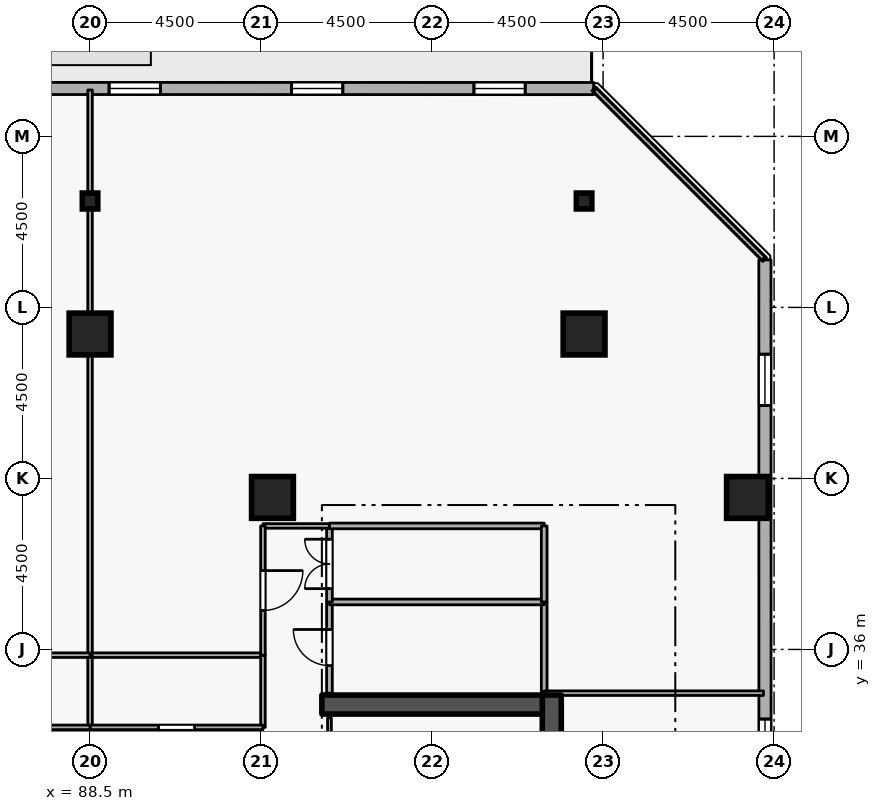
"""IFC4 building model, lengths in metres.
Left out: names, types, materials, properties, quantities, classifications, styles, units other than length and angle.
Written with IfcOpenShell. Run it as: python <this file> out.ifc"""

import sys

from ifc_helpers import new_model, si_unit, direction, frame, frame_2d, origin, origin_2d, place, context, subcontext, project, spatial, rectangle, i_section, extrude, element, fill, save


model = new_model("IFC4")
c1 = context("Model", 3, precision=1e-05, world=origin(), true_north=direction((0.0, 1.0)))
c2 = subcontext(c1, "Body", "Model", "MODEL_VIEW")
j1 = project(units=[si_unit("LENGTHUNIT", "METRE"), si_unit("PLANEANGLEUNIT", "RADIAN")], contexts=[c1])
p1 = place(None, origin())
s1 = spatial("IfcSite", under=j1, at=p1, CompositionType="ELEMENT")
p2 = place(p1, origin())
s2 = spatial("IfcBuilding", under=s1, at=p2, CompositionType="ELEMENT")
p3 = place(p2, frame((0.0, 0.0, 196.5)))
s3 = spatial("IfcBuildingStorey", under=s2, at=p3, CompositionType="ELEMENT", Elevation=196.5)
p4 = place(p3, frame((100.65, 19.2, 0.0), z_axis=(0.0, 0.0, 1.0), x_axis=(0.0, 1.0, 0.0)))
e1 = element("IfcWall", 1, at=p4, inside=s3, PredefinedType="SHEAR", context=c2, shape_type="SweptSolid", body=[
    extrude(rectangle(XDim=15.6, YDim=0.5, at=frame_2d((7.8, 0.0))), origin(), (0.0, 0.0, 1.0), 3.6),
])
p5 = place(p3, frame((94.6, 34.55, 0.0), z_axis=(0.0, 0.0, 1.0), x_axis=(1.0, 0.0, 0.0)))
e2 = element("IfcWall", 2, at=p5, inside=s3, PredefinedType="SHEAR", context=c2, shape_type="SweptSolid", body=[
    extrude(rectangle(XDim=5.8, YDim=0.5, at=frame_2d((2.9, 0.0))), origin(), (0.0, 0.0, 1.0), 3.6),
])
for number, where, z_axis, x_axis in (
    (3, (105.8, 40.0, 0.0), (0.0, 0.0, 1.0), (1.0, 0.0, 0.0)),
    (4, (101.5, 44.3, 0.0), (0.0, 0.0, 1.0), (1.0, 0.0, 0.0)),
    (5, (88.5, 44.3, 0.0), (0.0, 0.0, 1.0), (1.0, 0.0, 0.0)),
    (6, (93.3, 40.0, 0.0), (0.0, 0.0, 1.0), (1.0, 0.0, 0.0)),
):
    element("IfcColumn", number, at=place(p3, frame(where, z_axis=z_axis, x_axis=x_axis)), inside=s3, PredefinedType="COLUMN", context=c2, shape_type="SweptSolid", body=[
        extrude(rectangle(XDim=1.1, YDim=1.1, at=origin_2d()), origin(), (0.0, 0.0, 1.0), 3.6),
    ])
for number, where, z_axis, x_axis in (
    (7, (101.5, 47.8, 0.0), (0.0, 0.0, 1.0), (1.0, 0.0, 0.0)),
    (8, (88.5, 47.8, 0.0), (0.0, 0.0, 1.0), (1.0, 0.0, 0.0)),
):
    element("IfcColumn", number, at=place(p3, frame(where, z_axis=z_axis, x_axis=x_axis)), inside=s3, PredefinedType="COLUMN", context=c2, shape_type="SweptSolid", body=[
        extrude(i_section(OverallWidth=0.407, OverallDepth=0.419, WebThickness=0.031, FlangeThickness=0.049, FilletRadius=0.015, at=origin_2d()), origin(), (0.0, 0.0, 1.0), 3.6),
    ])
p6 = place(p3, frame((106.265, 11.819, 0.0), z_axis=(0.0, 0.0, 1.0), x_axis=(-0.000184351399, 0.999999983007, 0.0)))
e9 = element("IfcWall", 9, at=p6, inside=s3, PredefinedType="STANDARD", context=c2, shape_type="SweptSolid", body=[
    extrude(rectangle(XDim=34.432, YDim=0.32, at=frame_2d((17.216, 0.0))), origin(), (0.0, 0.0, 1.0), 2.22),
])
p7 = place(p6, frame((6.6, 0.0, 0.72)))
e10 = element("IfcOpeningElement", 10, at=p7, cuts=e9, PredefinedType="OPENING", context=c2, shape_type="SweptSolid", body=[
    extrude(rectangle(XDim=1.35, YDim=1.05, at=frame_2d((0.675, 0.525))), frame((0.0, 0.17, 0.0), z_axis=(0.0, -1.0, 0.0), x_axis=(1.0, 0.0, 0.0)), (0.0, 0.0, 1.0), 0.34),
])
p8 = place(p6, frame((11.4, 0.0, 0.72)))
e11 = element("IfcOpeningElement", 11, at=p8, cuts=e9, PredefinedType="OPENING", context=c2, shape_type="SweptSolid", body=[
    extrude(rectangle(XDim=1.35, YDim=1.05, at=frame_2d((0.675, 0.525))), frame((0.0, 0.17, 0.0), z_axis=(0.0, -1.0, 0.0), x_axis=(1.0, 0.0, 0.0)), (0.0, 0.0, 1.0), 0.34),
])
p9 = place(p6, frame((21.0, 0.0, 0.72)))
e12 = element("IfcOpeningElement", 12, at=p9, cuts=e9, PredefinedType="OPENING", context=c2, shape_type="SweptSolid", body=[
    extrude(rectangle(XDim=1.35, YDim=1.05, at=frame_2d((0.675, 0.525))), frame((0.0, 0.17, 0.0), z_axis=(0.0, -1.0, 0.0), x_axis=(1.0, 0.0, 0.0)), (0.0, 0.0, 1.0), 0.34),
])
p10 = place(p6, frame((30.6, 0.0, 0.72)))
e13 = element("IfcOpeningElement", 13, at=p10, cuts=e9, PredefinedType="OPENING", context=c2, shape_type="SweptSolid", body=[
    extrude(rectangle(XDim=1.35, YDim=1.05, at=frame_2d((0.675, 0.525))), frame((0.0, 0.17, 0.0), z_axis=(0.0, -1.0, 0.0), x_axis=(1.0, 0.0, 0.0)), (0.0, 0.0, 1.0), 0.34),
])
p11 = place(p3, frame((101.751, 50.758, 0.0), z_axis=(0.0, 0.0, 1.0), x_axis=(-0.999999983007, 0.000184351399, 0.0)))
e14 = element("IfcWall", 14, at=p11, inside=s3, PredefinedType="STANDARD", context=c2, shape_type="SweptSolid", body=[
    extrude(rectangle(XDim=34.432, YDim=0.32, at=frame_2d((17.216, 0.0))), origin(), (0.0, 0.0, 1.0), 2.22),
])
p12 = place(p11, frame((19.016, 0.0, 0.0)))
e15 = element("IfcOpeningElement", 15, at=p12, cuts=e14, PredefinedType="OPENING", context=c2, shape_type="SweptSolid", body=[
    extrude(rectangle(XDim=1.0, YDim=2.08, at=frame_2d((0.5, 1.04))), frame((0.0, 0.17, 0.0), z_axis=(0.0, -1.0, 0.0), x_axis=(1.0, 0.0, 0.0)), (0.0, 0.0, 1.0), 0.34),
])
p13 = place(p11, frame((1.8, 0.0, 0.72)))
e16 = element("IfcOpeningElement", 16, at=p13, cuts=e14, PredefinedType="OPENING", context=c2, shape_type="SweptSolid", body=[
    extrude(rectangle(XDim=1.35, YDim=1.05, at=frame_2d((0.675, 0.525))), frame((0.0, 0.17, 0.0), z_axis=(0.0, -1.0, 0.0), x_axis=(1.0, 0.0, 0.0)), (0.0, 0.0, 1.0), 0.34),
])
p14 = place(p11, frame((6.6, 0.0, 0.72)))
e17 = element("IfcOpeningElement", 17, at=p14, cuts=e14, PredefinedType="OPENING", context=c2, shape_type="SweptSolid", body=[
    extrude(rectangle(XDim=1.35, YDim=1.05, at=frame_2d((0.675, 0.525))), frame((0.0, 0.17, 0.0), z_axis=(0.0, -1.0, 0.0), x_axis=(1.0, 0.0, 0.0)), (0.0, 0.0, 1.0), 0.34),
])
p15 = place(p11, frame((11.4, 0.0, 0.72)))
e18 = element("IfcOpeningElement", 18, at=p15, cuts=e14, PredefinedType="OPENING", context=c2, shape_type="SweptSolid", body=[
    extrude(rectangle(XDim=1.35, YDim=1.05, at=frame_2d((0.675, 0.525))), frame((0.0, 0.17, 0.0), z_axis=(0.0, -1.0, 0.0), x_axis=(1.0, 0.0, 0.0)), (0.0, 0.0, 1.0), 0.34),
])
p16 = place(p11, frame((16.2, 0.0, 0.72)))
e19 = element("IfcOpeningElement", 19, at=p16, cuts=e14, PredefinedType="OPENING", context=c2, shape_type="SweptSolid", body=[
    extrude(rectangle(XDim=1.35, YDim=1.05, at=frame_2d((0.675, 0.525))), frame((0.0, 0.17, 0.0), z_axis=(0.0, -1.0, 0.0), x_axis=(1.0, 0.0, 0.0)), (0.0, 0.0, 1.0), 0.34),
])
p17 = place(p11, frame((21.0, 0.0, 0.72)))
e20 = element("IfcOpeningElement", 20, at=p17, cuts=e14, PredefinedType="OPENING", context=c2, shape_type="SweptSolid", body=[
    extrude(rectangle(XDim=1.35, YDim=1.05, at=frame_2d((0.675, 0.525))), frame((0.0, 0.17, 0.0), z_axis=(0.0, -1.0, 0.0), x_axis=(1.0, 0.0, 0.0)), (0.0, 0.0, 1.0), 0.34),
])
p18 = place(p11, frame((25.8, 0.0, 0.72)))
e21 = element("IfcOpeningElement", 21, at=p18, cuts=e14, PredefinedType="OPENING", context=c2, shape_type="SweptSolid", body=[
    extrude(rectangle(XDim=1.35, YDim=1.05, at=frame_2d((0.675, 0.525))), frame((0.0, 0.17, 0.0), z_axis=(0.0, -1.0, 0.0), x_axis=(1.0, 0.0, 0.0)), (0.0, 0.0, 1.0), 0.34),
])
p19 = place(p11, frame((30.6, 0.0, 0.72)))
e22 = element("IfcOpeningElement", 22, at=p19, cuts=e14, PredefinedType="OPENING", context=c2, shape_type="SweptSolid", body=[
    extrude(rectangle(XDim=1.35, YDim=1.05, at=frame_2d((0.675, 0.525))), frame((0.0, 0.17, 0.0), z_axis=(0.0, -1.0, 0.0), x_axis=(1.0, 0.0, 0.0)), (0.0, 0.0, 1.0), 0.34),
])
p20 = place(p3, frame((94.8, 32.05, 0.0), z_axis=(0.0, 0.0, 1.0), x_axis=(0.0, 1.0, 0.0)))
e23 = element("IfcWall", 23, at=p20, inside=s3, PredefinedType="PARTITIONING", context=c2, shape_type="SweptSolid", body=[
    extrude(rectangle(XDim=2.15, YDim=0.1, at=frame_2d((1.075, 0.0))), origin(), (0.0, 0.0, 1.0), 3.32),
])
p21 = place(p20, frame((0.6, 0.0, 0.0)))
e24 = element("IfcOpeningElement", 24, at=p21, cuts=e23, PredefinedType="OPENING", context=c2, shape_type="SweptSolid", body=[
    extrude(rectangle(XDim=0.95, YDim=2.1, at=frame_2d((0.475, 1.05))), frame((0.0, 0.06, 0.0), z_axis=(0.0, -1.0, 0.0), x_axis=(1.0, 0.0, 0.0)), (0.0, 0.0, 1.0), 0.12),
])
p22 = place(p3, frame((100.45, 37.25, 0.0), z_axis=(0.0, 0.0, 1.0), x_axis=(0.0, -1.0, 0.0)))
e25 = element("IfcWall", 25, at=p22, inside=s3, PredefinedType="PARTITIONING", context=c2, shape_type="SweptSolid", body=[
    extrude(rectangle(XDim=2.4, YDim=0.15, at=frame_2d((1.2, 0.0))), origin(), (0.0, 0.0, 1.0), 3.32),
])
p23 = place(p3, frame((94.8, 34.85, 0.0), z_axis=(0.0, 0.0, 1.0), x_axis=(0.0, 1.0, 0.0)))
e26 = element("IfcWall", 26, at=p23, inside=s3, PredefinedType="PARTITIONING", context=c2, shape_type="SweptSolid", body=[
    extrude(rectangle(XDim=2.4, YDim=0.15, at=frame_2d((1.2, 0.0))), origin(), (0.0, 0.0, 1.0), 3.32),
])
p24 = place(p23, frame((0.725, 0.0, 0.0)))
e27 = element("IfcOpeningElement", 27, at=p24, cuts=e26, PredefinedType="OPENING", context=c2, shape_type="SweptSolid", body=[
    extrude(rectangle(XDim=0.95, YDim=2.1, at=frame_2d((0.475, 1.05))), frame((0.0, 0.085, 0.0), z_axis=(0.0, -1.0, 0.0), x_axis=(1.0, 0.0, 0.0)), (0.0, 0.0, 1.0), 0.17),
])
p25 = place(p3, frame((94.8, 37.25, 0.0), z_axis=(0.0, 0.0, 1.0), x_axis=(1.0, 0.0, 0.0)))
e28 = element("IfcWall", 28, at=p25, inside=s3, PredefinedType="PARTITIONING", context=c2, shape_type="SweptSolid", body=[
    extrude(rectangle(XDim=5.65, YDim=0.15, at=frame_2d((2.825, 0.0))), origin(), (0.0, 0.0, 1.0), 3.32),
])
p26 = place(p3, frame((94.8, 37.25, 0.0), z_axis=(0.0, 0.0, 1.0), x_axis=(0.0, 1.0, 0.0)))
e29 = element("IfcWall", 29, at=p26, inside=s3, PredefinedType="PARTITIONING", context=c2, shape_type="SweptSolid", body=[
    extrude(rectangle(XDim=2.0, YDim=0.15, at=frame_2d((1.0, 0.0))), origin(), (0.0, 0.0, 1.0), 3.32),
])
p27 = place(p26, frame((0.35, 0.0, 0.0)))
e30 = element("IfcOpeningElement", 30, at=p27, cuts=e29, PredefinedType="OPENING", context=c2, shape_type="SweptSolid", body=[
    extrude(rectangle(XDim=1.3, YDim=2.12, at=frame_2d((0.65, 1.06))), frame((0.0, 0.085, 0.0), z_axis=(0.0, -1.0, 0.0), x_axis=(1.0, 0.0, 0.0)), (0.0, 0.0, 1.0), 0.17),
])
p28 = place(p3, frame((94.8, 39.25, 0.0), z_axis=(0.0, 0.0, 1.0), x_axis=(1.0, 0.0, 0.0)))
e31 = element("IfcWall", 31, at=p28, inside=s3, PredefinedType="PARTITIONING", context=c2, shape_type="SweptSolid", body=[
    extrude(rectangle(XDim=5.65, YDim=0.15, at=frame_2d((2.825, 0.0))), origin(), (0.0, 0.0, 1.0), 3.32),
])
p29 = place(p3, frame((100.45, 39.25, 0.0), z_axis=(0.0, 0.0, 1.0), x_axis=(0.0, -1.0, 0.0)))
e32 = element("IfcWall", 32, at=p29, inside=s3, PredefinedType="PARTITIONING", context=c2, shape_type="SweptSolid", body=[
    extrude(rectangle(XDim=2.0, YDim=0.15, at=frame_2d((1.0, 0.0))), origin(), (0.0, 0.0, 1.0), 3.32),
])
p30 = place(p3, frame((88.5, 33.95, 0.0), z_axis=(0.0, 0.0, 1.0), x_axis=(0.0, 1.0, 0.0)))
e33 = element("IfcWall", 33, at=p30, inside=s3, PredefinedType="PARTITIONING", context=c2, shape_type="SweptSolid", body=[
    extrude(rectangle(XDim=1.9, YDim=0.12, at=frame_2d((0.95, 0.0))), origin(), (0.0, 0.0, 1.0), 3.32),
])
p31 = place(p3, frame((88.5, 35.85, 0.0), z_axis=(0.0, 0.0, 1.0), x_axis=(1.0, 0.0, 0.0)))
e34 = element("IfcWall", 34, at=p31, inside=s3, PredefinedType="PARTITIONING", context=c2, shape_type="SweptSolid", body=[
    extrude(rectangle(XDim=4.55, YDim=0.12, at=frame_2d((2.275, 0.0))), origin(), (0.0, 0.0, 1.0), 3.32),
])
p32 = place(p3, frame((93.05, 35.85, 0.0), z_axis=(0.0, 0.0, 1.0), x_axis=(0.0, -1.0, 0.0)))
e35 = element("IfcWall", 35, at=p32, inside=s3, PredefinedType="PARTITIONING", context=c2, shape_type="SweptSolid", body=[
    extrude(rectangle(XDim=1.9, YDim=0.12, at=frame_2d((0.95, 0.0))), origin(), (0.0, 0.0, 1.0), 3.32),
])
p33 = place(p3, frame((93.05, 33.95, 0.0), z_axis=(0.0, 0.0, 1.0), x_axis=(-1.0, 0.0, 0.0)))
e36 = element("IfcWall", 36, at=p33, inside=s3, PredefinedType="PARTITIONING", context=c2, shape_type="SweptSolid", body=[
    extrude(rectangle(XDim=4.55, YDim=0.12, at=frame_2d((2.275, 0.0))), origin(), (0.0, 0.0, 1.0), 3.32),
])
p34 = place(p33, frame((1.8, 0.0, 0.0)))
e37 = element("IfcOpeningElement", 37, at=p34, cuts=e36, PredefinedType="OPENING", context=c2, shape_type="SweptSolid", body=[
    extrude(rectangle(XDim=0.95, YDim=2.1, at=frame_2d((0.475, 1.05))), frame((0.0, 0.07, 0.0), z_axis=(0.0, -1.0, 0.0), x_axis=(1.0, 0.0, 0.0)), (0.0, 0.0, 1.0), 0.14),
])
p35 = place(p3, frame((94.8, 39.25, 0.0), z_axis=(0.0, 0.0, 1.0), x_axis=(-1.0, 0.0, 0.0)))
e38 = element("IfcWall", 38, at=p35, inside=s3, PredefinedType="PARTITIONING", context=c2, shape_type="SweptSolid", body=[
    extrude(rectangle(XDim=1.75, YDim=0.12, at=frame_2d((0.875, 0.0))), origin(), (0.0, 0.0, 1.0), 3.32),
])
p36 = place(p3, frame((93.05, 39.25, 0.0), z_axis=(0.0, 0.0, 1.0), x_axis=(0.0, -1.0, 0.0)))
e39 = element("IfcWall", 39, at=p36, inside=s3, PredefinedType="PARTITIONING", context=c2, shape_type="SweptSolid", body=[
    extrude(rectangle(XDim=3.4, YDim=0.12, at=frame_2d((1.7, 0.0))), origin(), (0.0, 0.0, 1.0), 3.32),
])
p37 = place(p36, frame((1.175, 0.0, 0.0)))
e40 = element("IfcOpeningElement", 40, at=p37, cuts=e39, PredefinedType="OPENING", context=c2, shape_type="SweptSolid", body=[
    extrude(rectangle(XDim=1.05, YDim=2.1, at=frame_2d((0.525, 1.05))), frame((0.0, 0.07, 0.0), z_axis=(0.0, -1.0, 0.0), x_axis=(1.0, 0.0, 0.0)), (0.0, 0.0, 1.0), 0.14),
])
p38 = place(p3, frame((88.5, 35.85, 0.0), z_axis=(0.0, 0.0, 1.0), x_axis=(0.0, 1.0, 0.0)))
e41 = element("IfcWall", 41, at=p38, inside=s3, PredefinedType="PARTITIONING", context=c2, shape_type="SweptSolid", body=[
    extrude(rectangle(XDim=14.87, YDim=0.12, at=frame_2d((7.435, 0.0))), origin(), (0.0, 0.0, 1.0), 2.862),
])
p39 = place(p3, frame((101.787, 50.72, 0.0), z_axis=(0.0, 0.0, 1.0), x_axis=(0.707106781187, -0.707106781187, 0.0)))
e42 = element("IfcWall", 42, at=p39, inside=s3, PredefinedType="PARTITIONING", context=c2, shape_type="SweptSolid", body=[
    extrude(rectangle(XDim=6.269, YDim=0.12, at=frame_2d((3.134, 0.0))), origin(), (0.0, 0.0, 1.0), 3.32),
])
p40 = place(p3, frame((106.22, 34.85, 0.0), z_axis=(0.0, 0.0, 1.0), x_axis=(-1.0, 0.0, 0.0)))
e43 = element("IfcWall", 43, at=p40, inside=s3, PredefinedType="PARTITIONING", context=c2, shape_type="SweptSolid", body=[
    extrude(rectangle(XDim=5.77, YDim=0.12, at=frame_2d((2.885, 0.0))), origin(), (0.0, 0.0, 1.0), 2.525),
])
p41 = place(p3, frame((83.95, 35.85, 0.0), z_axis=(0.0, 0.0, 1.0), x_axis=(1.0, 0.0, 0.0)))
e44 = element("IfcWall", 44, at=p41, inside=s3, PredefinedType="PARTITIONING", context=c2, shape_type="SweptSolid", body=[
    extrude(rectangle(XDim=4.55, YDim=0.12, at=frame_2d((2.275, 0.0))), origin(), (0.0, 0.0, 1.0), 3.32),
])
p42 = place(p3, frame((88.5, 33.95, 0.0), z_axis=(0.0, 0.0, 1.0), x_axis=(-1.0, 0.0, 0.0)))
e45 = element("IfcWall", 45, at=p42, inside=s3, PredefinedType="PARTITIONING", context=c2, shape_type="SweptSolid", body=[
    extrude(rectangle(XDim=4.55, YDim=0.12, at=frame_2d((2.275, 0.0))), origin(), (0.0, 0.0, 1.0), 3.32),
])
p43 = place(p42, frame((1.8, 0.0, 0.0)))
e46 = element("IfcOpeningElement", 46, at=p43, cuts=e45, PredefinedType="OPENING", context=c2, shape_type="SweptSolid", body=[
    extrude(rectangle(XDim=0.95, YDim=2.1, at=frame_2d((0.475, 1.05))), frame((0.0, 0.07, 0.0), z_axis=(0.0, -1.0, 0.0), x_axis=(1.0, 0.0, 0.0)), (0.0, 0.0, 1.0), 0.14),
])
p44 = place(p9, origin())
e47 = element("IfcWindow", 47, at=p44, inside=s3, PartitioningType="SINGLE_PANEL", PredefinedType="WINDOW", context=c2, shape_type="SweptSolid", body=[
    extrude(rectangle(XDim=1.35, YDim=1.05, at=frame_2d((0.675, 0.525))), frame((0.0, 0.03, 0.0), z_axis=(0.0, -1.0, 0.0), x_axis=(1.0, 0.0, 0.0)), (0.0, 0.0, 1.0), 0.06),
])
fill(e12, e47)
p45 = place(p10, origin())
e48 = element("IfcWindow", 48, at=p45, inside=s3, PartitioningType="SINGLE_PANEL", PredefinedType="WINDOW", context=c2, shape_type="SweptSolid", body=[
    extrude(rectangle(XDim=1.35, YDim=1.05, at=frame_2d((0.675, 0.525))), frame((0.0, 0.03, 0.0), z_axis=(0.0, -1.0, 0.0), x_axis=(1.0, 0.0, 0.0)), (0.0, 0.0, 1.0), 0.06),
])
fill(e13, e48)
p46 = place(p13, origin())
e49 = element("IfcWindow", 49, at=p46, inside=s3, PartitioningType="SINGLE_PANEL", PredefinedType="WINDOW", context=c2, shape_type="SweptSolid", body=[
    extrude(rectangle(XDim=1.35, YDim=1.05, at=frame_2d((0.675, 0.525))), frame((0.0, 0.03, 0.0), z_axis=(0.0, -1.0, 0.0), x_axis=(1.0, 0.0, 0.0)), (0.0, 0.0, 1.0), 0.06),
])
fill(e16, e49)
p47 = place(p14, origin())
e50 = element("IfcWindow", 50, at=p47, inside=s3, PartitioningType="SINGLE_PANEL", PredefinedType="WINDOW", context=c2, shape_type="SweptSolid", body=[
    extrude(rectangle(XDim=1.35, YDim=1.05, at=frame_2d((0.675, 0.525))), frame((0.0, 0.03, 0.0), z_axis=(0.0, -1.0, 0.0), x_axis=(1.0, 0.0, 0.0)), (0.0, 0.0, 1.0), 0.06),
])
fill(e17, e50)
p48 = place(p15, origin())
e51 = element("IfcWindow", 51, at=p48, inside=s3, PartitioningType="SINGLE_PANEL", PredefinedType="WINDOW", context=c2, shape_type="SweptSolid", body=[
    extrude(rectangle(XDim=1.35, YDim=1.05, at=frame_2d((0.675, 0.525))), frame((0.0, 0.03, 0.0), z_axis=(0.0, -1.0, 0.0), x_axis=(1.0, 0.0, 0.0)), (0.0, 0.0, 1.0), 0.06),
])
fill(e18, e51)
p49 = place(p24, origin())
e52 = element("IfcDoor", 52, at=p49, inside=s3, OperationType="SINGLE_SWING_RIGHT", PredefinedType="DOOR", context=c2, shape_type="SweptSolid", body=[
    extrude(rectangle(XDim=0.95, YDim=2.1, at=frame_2d((0.475, 1.05))), frame((0.0, 0.025, 0.0), z_axis=(0.0, -1.0, 0.0), x_axis=(1.0, 0.0, 0.0)), (0.0, 0.0, 1.0), 0.05),
])
fill(e27, e52)
p50 = place(p27, origin())
e53 = element("IfcDoor", 53, at=p50, inside=s3, OperationType="DOUBLE_DOOR_SINGLE_SWING", PredefinedType="DOOR", context=c2, shape_type="SweptSolid", body=[
    extrude(rectangle(XDim=1.3, YDim=2.12, at=frame_2d((0.65, 1.06))), frame((0.0, 0.025, 0.0), z_axis=(0.0, -1.0, 0.0), x_axis=(1.0, 0.0, 0.0)), (0.0, 0.0, 1.0), 0.05),
])
fill(e30, e53)
p51 = place(p34, origin())
e54 = element("IfcDoor", 54, at=p51, inside=s3, OperationType="SINGLE_SWING_RIGHT", PredefinedType="DOOR", context=c2, shape_type="SweptSolid", body=[
    extrude(rectangle(XDim=0.95, YDim=2.1, at=frame_2d((0.475, 1.05))), frame((0.0, 0.025, 0.0), z_axis=(0.0, -1.0, 0.0), x_axis=(1.0, 0.0, 0.0)), (0.0, 0.0, 1.0), 0.05),
])
fill(e37, e54)
p52 = place(p37, origin())
e55 = element("IfcDoor", 55, at=p52, inside=s3, OperationType="SINGLE_SWING_LEFT", PredefinedType="DOOR", context=c2, shape_type="SweptSolid", body=[
    extrude(rectangle(XDim=1.05, YDim=2.1, at=frame_2d((0.525, 1.05))), frame((0.0, 0.025, 0.0), z_axis=(0.0, -1.0, 0.0), x_axis=(1.0, 0.0, 0.0)), (0.0, 0.0, 1.0), 0.05),
])
fill(e40, e55)
save(model, sys.argv[1])
